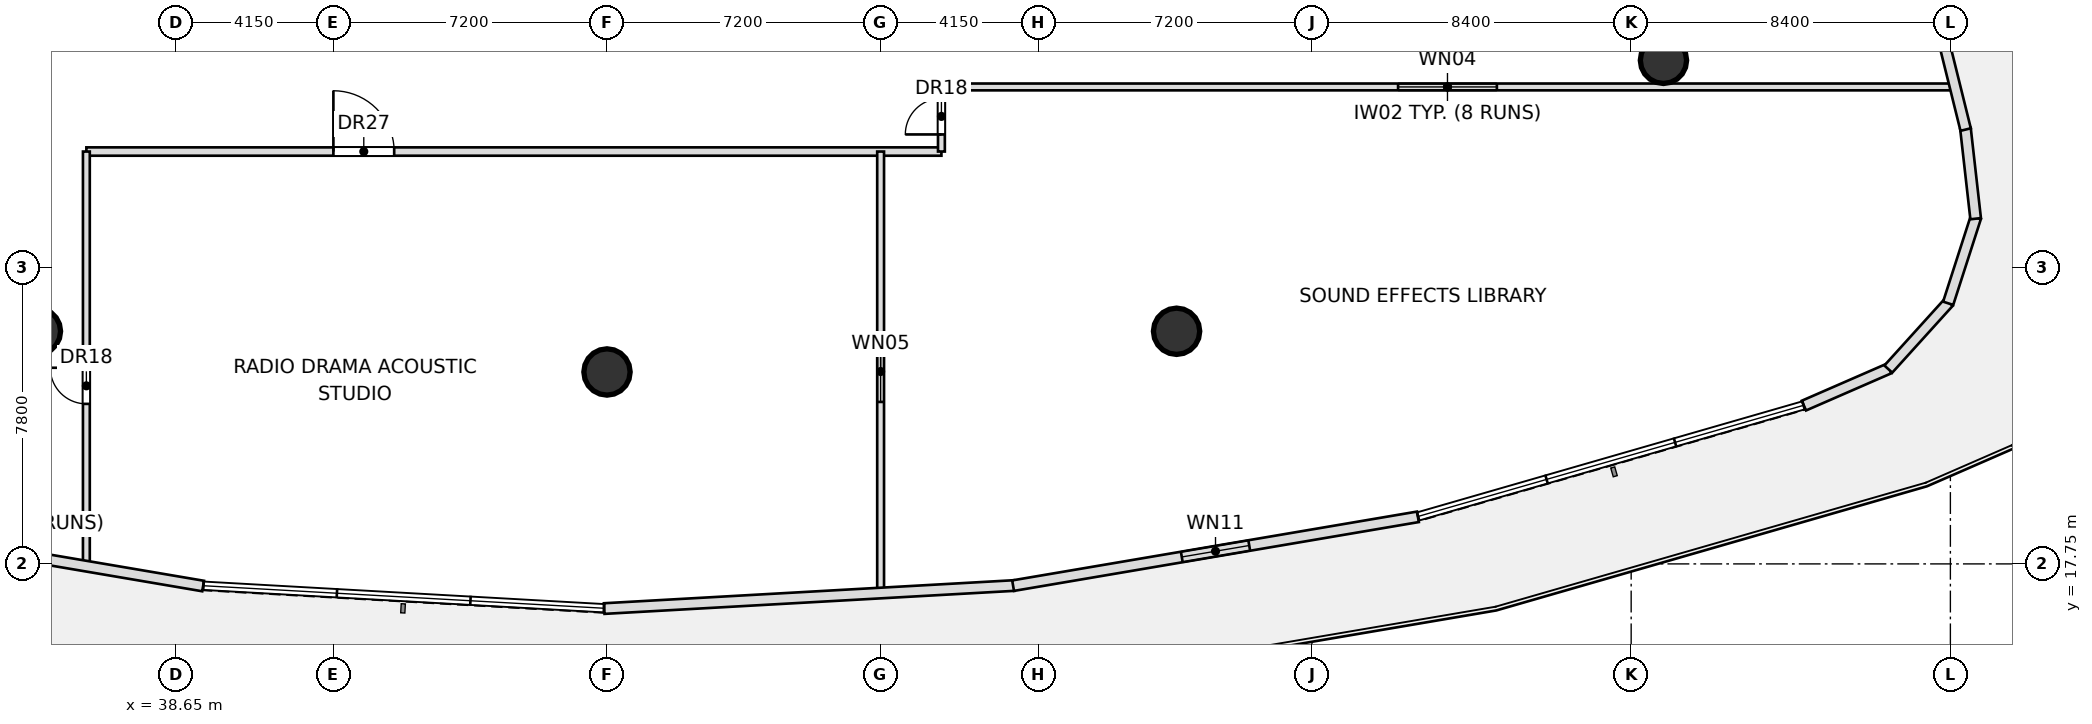
"""IFC4 building model, lengths in metres.
Left out: names, types, materials, properties, quantities, classifications, styles, units other than length and angle.
Written with IfcOpenShell. Run it as: python <this file> out.ifc"""

import sys

from ifc_helpers import new_model, si_unit, direction, frame, frame_2d, origin, origin_2d, place, context, subcontext, project, spatial, rectangle, hollow_circle, extrude, element, fill, save


model = new_model("IFC4")
c1 = context("Model", 3, precision=1e-05, world=origin(), true_north=direction((0.0, 1.0)))
c2 = subcontext(c1, "Body", "Model", "MODEL_VIEW")
j1 = project(units=[si_unit("LENGTHUNIT", "METRE"), si_unit("PLANEANGLEUNIT", "RADIAN")], contexts=[c1])
p1 = place(None, origin())
s1 = spatial("IfcSite", under=j1, at=p1, CompositionType="ELEMENT")
p2 = place(p1, origin())
s2 = spatial("IfcBuilding", under=s1, at=p2, CompositionType="ELEMENT")
p3 = place(p2, frame((0.0, 0.0, 11.4)))
s3 = spatial("IfcBuildingStorey", under=s2, at=p3, CompositionType="ELEMENT", Elevation=11.4)
for number, where, z_axis, x_axis in (
    (1, (35.012, 23.871, 0.0), (0.0, 0.0, 1.0), (1.0, 0.0, 0.0)),
    (2, (50.0, 22.8, 0.0), (0.0, 0.0, 1.0), (1.0, 0.0, 0.0)),
    (3, (64.988, 23.871, 0.0), (0.0, 0.0, 1.0), (1.0, 0.0, 0.0)),
    (4, (77.8, 31.0, 0.0), (0.0, 0.0, 1.0), (1.0, 0.0, 0.0)),
):
    element("IfcColumn", number, at=place(p3, frame(where, z_axis=z_axis, x_axis=x_axis)), inside=s3, PredefinedType="COLUMN", context=c2, shape_type="SweptSolid", body=[
        extrude(hollow_circle(Radius=0.61, WallThickness=0.05, at=origin_2d()), origin(), (0.0, 0.0, 1.0), 5.05),
    ])
p4 = place(p3, frame((36.3, 28.6, 0.0), z_axis=(0.0, 0.0, 1.0), x_axis=(1.0, 0.0, 0.0)))
e5 = element("IfcWall", 5, at=p4, inside=s3, PredefinedType="PARTITIONING", context=c2, shape_type="SweptSolid", body=[
    extrude(rectangle(XDim=22.5, YDim=0.22, at=frame_2d((11.25, 0.0))), origin(), (0.0, 0.0, 1.0), 4.125),
])
p5 = place(p4, frame((6.5, 0.0, 0.0)))
e6 = element("IfcOpeningElement", 6, at=p5, cuts=e5, PredefinedType="OPENING", context=c2, shape_type="SweptSolid", body=[
    extrude(rectangle(XDim=1.6, YDim=2.3, at=frame_2d((0.8, 1.15))), frame((0.0, 0.12, 0.0), z_axis=(0.0, -1.0, 0.0), x_axis=(1.0, 0.0, 0.0)), (0.0, 0.0, 1.0), 0.24),
])
p6 = place(p3, frame((36.3, 17.731, 0.0), z_axis=(0.0, 0.0, 1.0), x_axis=(0.0, 1.0, 0.0)))
e7 = element("IfcWall", 7, at=p6, inside=s3, PredefinedType="PARTITIONING", context=c2, shape_type="SweptSolid", body=[
    extrude(rectangle(XDim=10.869, YDim=0.18, at=frame_2d((5.435, 0.0))), origin(), (0.0, 0.0, 1.0), 4.225),
])
p7 = place(p6, frame((4.23, 0.0, 0.0)))
e8 = element("IfcOpeningElement", 8, at=p7, cuts=e7, PredefinedType="OPENING", context=c2, shape_type="SweptSolid", body=[
    extrude(rectangle(XDim=0.95, YDim=2.05, at=frame_2d((0.475, 1.025))), frame((0.0, 0.1, 0.0), z_axis=(0.0, -1.0, 0.0), x_axis=(1.0, 0.0, 0.0)), (0.0, 0.0, 1.0), 0.2),
])
p8 = place(p3, frame((58.8, 28.6, 0.0), z_axis=(0.0, 0.0, 1.0), x_axis=(0.0, 1.0, 0.0)))
e9 = element("IfcWall", 9, at=p8, inside=s3, PredefinedType="PARTITIONING", context=c2, shape_type="SweptSolid", body=[
    extrude(rectangle(XDim=1.75, YDim=0.18, at=frame_2d((0.875, 0.0))), origin(), (0.0, 0.0, 1.0), 5.05),
])
p9 = place(p8, frame((0.45, 0.0, 0.0)))
e10 = element("IfcOpeningElement", 10, at=p9, cuts=e9, PredefinedType="OPENING", context=c2, shape_type="SweptSolid", body=[
    extrude(rectangle(XDim=0.95, YDim=2.05, at=frame_2d((0.475, 1.025))), frame((0.0, 0.1, 0.0), z_axis=(0.0, -1.0, 0.0), x_axis=(1.0, 0.0, 0.0)), (0.0, 0.0, 1.0), 0.2),
])
p10 = place(p3, frame((58.8, 30.3, 0.0), z_axis=(0.0, 0.0, 1.0), x_axis=(1.0, 0.0, 0.0)))
e11 = element("IfcWall", 11, at=p10, inside=s3, PredefinedType="PARTITIONING", context=c2, shape_type="SweptSolid", body=[
    extrude(rectangle(XDim=26.633, YDim=0.18, at=frame_2d((13.316, 0.0))), origin(), (0.0, 0.0, 1.0), 4.125),
])
p11 = place(p10, frame((12.016, 0.0, 1.05)))
e12 = element("IfcOpeningElement", 12, at=p11, cuts=e11, PredefinedType="OPENING", context=c2, shape_type="SweptSolid", body=[
    extrude(rectangle(XDim=2.6, YDim=1.5, at=frame_2d((1.3, 0.75))), frame((0.0, 0.1, 0.0), z_axis=(0.0, -1.0, 0.0), x_axis=(1.0, 0.0, 0.0)), (0.0, 0.0, 1.0), 0.2),
])
p12 = place(p3, frame((57.2, 17.023, 0.0), z_axis=(0.0, 0.0, 1.0), x_axis=(0.0, 1.0, 0.0)))
e13 = element("IfcWall", 13, at=p12, inside=s3, PredefinedType="PARTITIONING", context=c2, shape_type="SweptSolid", body=[
    extrude(rectangle(XDim=11.577, YDim=0.18, at=frame_2d((5.788, 0.0))), origin(), (0.0, 0.0, 1.0), 4.225),
])
p13 = place(p12, frame((4.988, 0.0, 1.05)))
e14 = element("IfcOpeningElement", 14, at=p13, cuts=e13, PredefinedType="OPENING", context=c2, shape_type="SweptSolid", body=[
    extrude(rectangle(XDim=1.6, YDim=1.35, at=frame_2d((0.8, 0.675))), frame((0.0, 0.1, 0.0), z_axis=(0.0, -1.0, 0.0), x_axis=(1.0, 0.0, 0.0)), (0.0, 0.0, 1.0), 0.2),
])
p14 = place(p3, frame((28.719, 18.979, 0.0), z_axis=(0.0, 0.0, 1.0), x_axis=(0.985856929161, -0.167589126212, 0.0)))
e15 = element("IfcWall", 15, at=p14, inside=s3, PredefinedType="STANDARD", context=c2, shape_type="SweptSolid", body=[
    extrude(rectangle(XDim=10.806, YDim=0.28, at=frame_2d((5.403, 0.0))), origin(), (0.0, 0.0, 1.0), 5.05),
])
p15 = place(p3, frame((49.926, 16.575, 0.0), z_axis=(0.0, 0.0, 1.0), x_axis=(0.998425400469, 0.056095629935, 0.0)))
e16 = element("IfcWall", 16, at=p15, inside=s3, PredefinedType="STANDARD", context=c2, shape_type="SweptSolid", body=[
    extrude(rectangle(XDim=10.807, YDim=0.28, at=frame_2d((5.403, 0.0))), origin(), (0.0, 0.0, 1.0), 5.05),
])
p16 = place(p3, frame((60.686, 17.177, 0.0), z_axis=(0.0, 0.0, 1.0), x_axis=(0.985852561555, 0.16761481699, 0.0)))
e17 = element("IfcWall", 17, at=p16, inside=s3, PredefinedType="STANDARD", context=c2, shape_type="SweptSolid", body=[
    extrude(rectangle(XDim=10.806, YDim=0.28, at=frame_2d((5.403, 0.0))), origin(), (0.0, 0.0, 1.0), 5.05),
])
p17 = place(p16, frame((4.503, 0.0, 1.0)))
e18 = element("IfcOpeningElement", 18, at=p17, cuts=e17, PredefinedType="OPENING", context=c2, shape_type="SweptSolid", body=[
    extrude(rectangle(XDim=1.8, YDim=2.2, at=frame_2d((0.9, 1.1))), frame((0.0, 0.15, 0.0), z_axis=(0.0, -1.0, 0.0), x_axis=(1.0, 0.0, 0.0)), (0.0, 0.0, 1.0), 0.3),
])
p18 = place(p3, frame((81.495, 21.915, 0.0), z_axis=(0.0, 0.0, 1.0), x_axis=(0.916714689294, 0.399542461363, 0.0)))
e19 = element("IfcWall", 19, at=p18, inside=s3, PredefinedType="STANDARD", context=c2, shape_type="SweptSolid", body=[
    extrude(rectangle(XDim=2.449, YDim=0.28, at=frame_2d((1.225, 0.0))), origin(), (0.0, 0.0, 1.0), 5.05),
])
p19 = place(p3, frame((83.717, 22.876, 0.0), z_axis=(0.0, 0.0, 1.0), x_axis=(0.670983479807, 0.741472298758, 0.0)))
e20 = element("IfcWall", 20, at=p19, inside=s3, PredefinedType="STANDARD", context=c2, shape_type="SweptSolid", body=[
    extrude(rectangle(XDim=2.369, YDim=0.28, at=frame_2d((1.185, 0.0))), origin(), (0.0, 0.0, 1.0), 5.05),
])
p20 = place(p3, frame((85.292, 24.607, 0.0), z_axis=(0.0, 0.0, 1.0), x_axis=(0.30659625248, 0.951839659799, 0.0)))
e21 = element("IfcWall", 21, at=p20, inside=s3, PredefinedType="STANDARD", context=c2, shape_type="SweptSolid", body=[
    extrude(rectangle(XDim=2.369, YDim=0.28, at=frame_2d((1.185, 0.0))), origin(), (0.0, 0.0, 1.0), 5.05),
])
p21 = place(p3, frame((86.015, 26.833, 0.0), z_axis=(0.0, 0.0, 1.0), x_axis=(-0.112359618556, 0.993667608468, 0.0)))
e22 = element("IfcWall", 22, at=p21, inside=s3, PredefinedType="STANDARD", context=c2, shape_type="SweptSolid", body=[
    extrude(rectangle(XDim=2.39, YDim=0.28, at=frame_2d((1.195, 0.0))), origin(), (0.0, 0.0, 1.0), 5.05),
])
p22 = place(p3, frame((85.752, 29.179, 0.0), z_axis=(0.0, 0.0, 1.0), x_axis=(-0.240568039918, 0.970632277523, 0.0)))
e23 = element("IfcWall", 23, at=p22, inside=s3, PredefinedType="STANDARD", context=c2, shape_type="SweptSolid", body=[
    extrude(rectangle(XDim=10.805, YDim=0.28, at=frame_2d((5.403, 0.0))), origin(), (0.0, 0.0, 1.0), 5.05),
])
p23 = place(p22, frame((4.503, 0.0, 1.0)))
e24 = element("IfcOpeningElement", 24, at=p23, cuts=e23, PredefinedType="OPENING", context=c2, shape_type="SweptSolid", body=[
    extrude(rectangle(XDim=1.8, YDim=2.2, at=frame_2d((0.9, 1.1))), frame((0.0, 0.15, 0.0), z_axis=(0.0, -1.0, 0.0), x_axis=(1.0, 0.0, 0.0)), (0.0, 0.0, 1.0), 0.3),
])
p24 = place(p5, origin())
e25 = element("IfcDoor", 25, at=p24, inside=s3, OperationType="SINGLE_SWING_LEFT", PredefinedType="DOOR", context=c2, shape_type="SweptSolid", body=[
    extrude(rectangle(XDim=1.6, YDim=2.3, at=frame_2d((0.8, 1.15))), frame((0.0, 0.025, 0.0), z_axis=(0.0, -1.0, 0.0), x_axis=(1.0, 0.0, 0.0)), (0.0, 0.0, 1.0), 0.05),
])
fill(e6, e25)
p25 = place(p7, origin())
e26 = element("IfcDoor", 26, at=p25, inside=s3, OperationType="SINGLE_SWING_RIGHT", PredefinedType="DOOR", context=c2, shape_type="SweptSolid", body=[
    extrude(rectangle(XDim=0.95, YDim=2.05, at=frame_2d((0.475, 1.025))), frame((0.0, 0.025, 0.0), z_axis=(0.0, -1.0, 0.0), x_axis=(1.0, 0.0, 0.0)), (0.0, 0.0, 1.0), 0.05),
])
fill(e8, e26)
p26 = place(p9, origin())
e27 = element("IfcDoor", 27, at=p26, inside=s3, OperationType="SINGLE_SWING_LEFT", PredefinedType="DOOR", context=c2, shape_type="SweptSolid", body=[
    extrude(rectangle(XDim=0.95, YDim=2.05, at=frame_2d((0.475, 1.025))), frame((0.0, 0.025, 0.0), z_axis=(0.0, -1.0, 0.0), x_axis=(1.0, 0.0, 0.0)), (0.0, 0.0, 1.0), 0.05),
])
fill(e10, e27)
p27 = place(p17, origin())
e28 = element("IfcWindow", 28, at=p27, inside=s3, PartitioningType="SINGLE_PANEL", PredefinedType="WINDOW", context=c2, shape_type="SweptSolid", body=[
    extrude(rectangle(XDim=1.8, YDim=2.2, at=frame_2d((0.9, 1.1))), frame((0.0, 0.03, 0.0), z_axis=(0.0, -1.0, 0.0), x_axis=(1.0, 0.0, 0.0)), (0.0, 0.0, 1.0), 0.06),
])
fill(e18, e28)
p28 = place(p11, origin())
e29 = element("IfcWindow", 29, at=p28, inside=s3, PartitioningType="SINGLE_PANEL", PredefinedType="WINDOW", context=c2, shape_type="SweptSolid", body=[
    extrude(rectangle(XDim=2.6, YDim=1.5, at=frame_2d((1.3, 0.75))), frame((0.0, 0.03, 0.0), z_axis=(0.0, -1.0, 0.0), x_axis=(1.0, 0.0, 0.0)), (0.0, 0.0, 1.0), 0.06),
])
fill(e12, e29)
p29 = place(p13, origin())
e30 = element("IfcWindow", 30, at=p29, inside=s3, PartitioningType="SINGLE_PANEL", PredefinedType="WINDOW", context=c2, shape_type="SweptSolid", body=[
    extrude(rectangle(XDim=1.6, YDim=1.35, at=frame_2d((0.8, 0.675))), frame((0.0, 0.03, 0.0), z_axis=(0.0, -1.0, 0.0), x_axis=(1.0, 0.0, 0.0)), (0.0, 0.0, 1.0), 0.06),
])
fill(e14, e30)
save(model, sys.argv[1])
